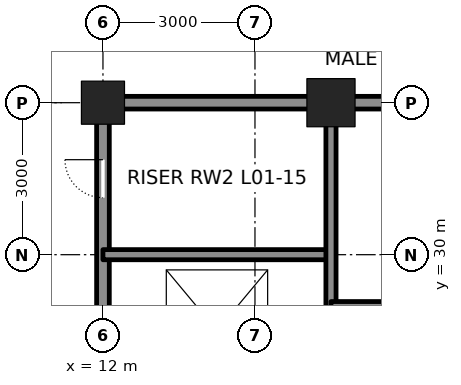
"""IFC4 building model, lengths in metres.
Left out: names, types, materials, properties, quantities, classifications, styles, units other than length and angle.
Written with IfcOpenShell. Run it as: python <this file> out.ifc"""

import sys

from ifc_helpers import new_model, si_unit, direction, frame, frame_2d, origin, origin_2d, place, context, subcontext, project, spatial, rectangle, hollow_rectangle, extrude, element, fill, save


model = new_model("IFC4")
c1 = context("Model", 3, precision=1e-05, world=origin(), true_north=direction((0.0, 1.0)))
c2 = subcontext(c1, "Body", "Model", "MODEL_VIEW")
j1 = project(units=[si_unit("LENGTHUNIT", "METRE"), si_unit("PLANEANGLEUNIT", "RADIAN")], contexts=[c1])
p1 = place(None, origin())
s1 = spatial("IfcSite", under=j1, at=p1, CompositionType="ELEMENT")
p2 = place(p1, origin())
s2 = spatial("IfcBuilding", under=s1, at=p2, CompositionType="ELEMENT")
p3 = place(p2, frame((0.0, 0.0, 6.0)))
s3 = spatial("IfcBuildingStorey", under=s2, at=p3, CompositionType="ELEMENT", Elevation=6.0)
p4 = place(p3, frame((12.0, 33.0, 0.0), z_axis=(0.0, 0.0, 1.0), x_axis=(1.0, 0.0, 0.0)))
e1 = element("IfcColumn", 1, at=p4, inside=s3, PredefinedType="COLUMN", context=c2, shape_type="SweptSolid", body=[
    extrude(hollow_rectangle(XDim=0.85, YDim=0.85, WallThickness=0.085, at=origin_2d()), origin(), (0.0, 0.0, 1.0), 7.5),
])
p5 = place(p3, frame((16.5, 33.0, 0.0), z_axis=(0.0, 0.0, 1.0), x_axis=(1.0, 0.0, 0.0)))
e2 = element("IfcColumn", 2, at=p5, inside=s3, PredefinedType="COLUMN", context=c2, shape_type="SweptSolid", body=[
    extrude(hollow_rectangle(XDim=0.95, YDim=0.95, WallThickness=0.095, at=origin_2d()), origin(), (0.0, 0.0, 1.0), 7.5),
])
p6 = place(p3, frame((12.0, 24.25, 0.0), z_axis=(0.0, 0.0, 1.0), x_axis=(0.0, 1.0, 0.0)))
e3 = element("IfcWall", 3, at=p6, inside=s3, PredefinedType="SOLIDWALL", context=c2, shape_type="SweptSolid", body=[
    extrude(rectangle(XDim=8.5, YDim=0.25, at=frame_2d((4.25, 0.0))), origin(), (0.0, 0.0, 1.0), 6.373),
])
p7 = place(p6, frame((0.65, 0.0, 0.0)))
e4 = element("IfcOpeningElement", 4, at=p7, cuts=e3, PredefinedType="OPENING", context=c2, shape_type="SweptSolid", body=[
    extrude(rectangle(XDim=1.2, YDim=2.1, at=frame_2d((0.6, 1.05))), frame((0.0, 0.135, 0.0), z_axis=(0.0, -1.0, 0.0), x_axis=(1.0, 0.0, 0.0)), (0.0, 0.0, 1.0), 0.27),
])
p8 = place(p6, frame((6.875, 0.0, 0.0)))
e5 = element("IfcOpeningElement", 5, at=p8, cuts=e3, PredefinedType="OPENING", context=c2, shape_type="SweptSolid", body=[
    extrude(rectangle(XDim=0.75, YDim=2.1, at=frame_2d((0.375, 1.05))), frame((0.0, 0.135, 0.0), z_axis=(0.0, -1.0, 0.0), x_axis=(1.0, 0.0, 0.0)), (0.0, 0.0, 1.0), 0.27),
])
p9 = place(p3, frame((12.0, 30.0, 0.0), z_axis=(0.0, 0.0, 1.0), x_axis=(1.0, 0.0, 0.0)))
e6 = element("IfcWall", 6, at=p9, inside=s3, PredefinedType="SOLIDWALL", context=c2, shape_type="SweptSolid", body=[
    extrude(rectangle(XDim=4.5, YDim=0.2, at=frame_2d((2.25, 0.0))), origin(), (0.0, 0.0, 1.0), 7.3),
])
p10 = place(p3, frame((12.25, 33.0, 0.0), z_axis=(0.0, 0.0, 1.0), x_axis=(1.0, 0.0, 0.0)))
e7 = element("IfcWall", 7, at=p10, inside=s3, PredefinedType="SOLIDWALL", context=c2, shape_type="SweptSolid", body=[
    extrude(rectangle(XDim=4.0, YDim=0.25, at=frame_2d((2.0, 0.0))), origin(), (0.0, 0.0, 1.0), 6.441),
])
p11 = place(p3, frame((16.75, 33.0, 0.0), z_axis=(0.0, 0.0, 1.0), x_axis=(1.0, 0.0, 0.0)))
e8 = element("IfcWall", 8, at=p11, inside=s3, PredefinedType="SOLIDWALL", context=c2, shape_type="SweptSolid", body=[
    extrude(rectangle(XDim=2.5, YDim=0.25, at=frame_2d((1.25, 0.0))), origin(), (0.0, 0.0, 1.0), 6.441),
])
p12 = place(p3, frame((16.5, 24.25, 0.0), z_axis=(0.0, 0.0, 1.0), x_axis=(0.0, 1.0, 0.0)))
e9 = element("IfcWall", 9, at=p12, inside=s3, PredefinedType="SOLIDWALL", context=c2, shape_type="SweptSolid", body=[
    extrude(rectangle(XDim=8.5, YDim=0.2, at=frame_2d((4.25, 0.0))), origin(), (0.0, 0.0, 1.0), 6.373),
])
p13 = place(p3, frame((16.5, 29.0, 0.0), z_axis=(0.0, 0.0, 1.0), x_axis=(1.0, 0.0, 0.0)))
e10 = element("IfcWall", 10, at=p13, inside=s3, PredefinedType="PARTITIONING", context=c2, shape_type="SweptSolid", body=[
    extrude(rectangle(XDim=3.0, YDim=0.15, at=frame_2d((1.5, 0.0))), origin(), (0.0, 0.0, 1.0), 7.3),
])
p14 = place(p8, origin())
e11 = element("IfcDoor", 11, at=p14, inside=s3, OperationType="SINGLE_SWING_RIGHT", PredefinedType="DOOR", context=c2, shape_type="SweptSolid", body=[
    extrude(rectangle(XDim=0.75, YDim=2.1, at=frame_2d((0.375, 1.05))), frame((0.0, 0.025, 0.0), z_axis=(0.0, -1.0, 0.0), x_axis=(1.0, 0.0, 0.0)), (0.0, 0.0, 1.0), 0.05),
])
fill(e5, e11)
save(model, sys.argv[1])
